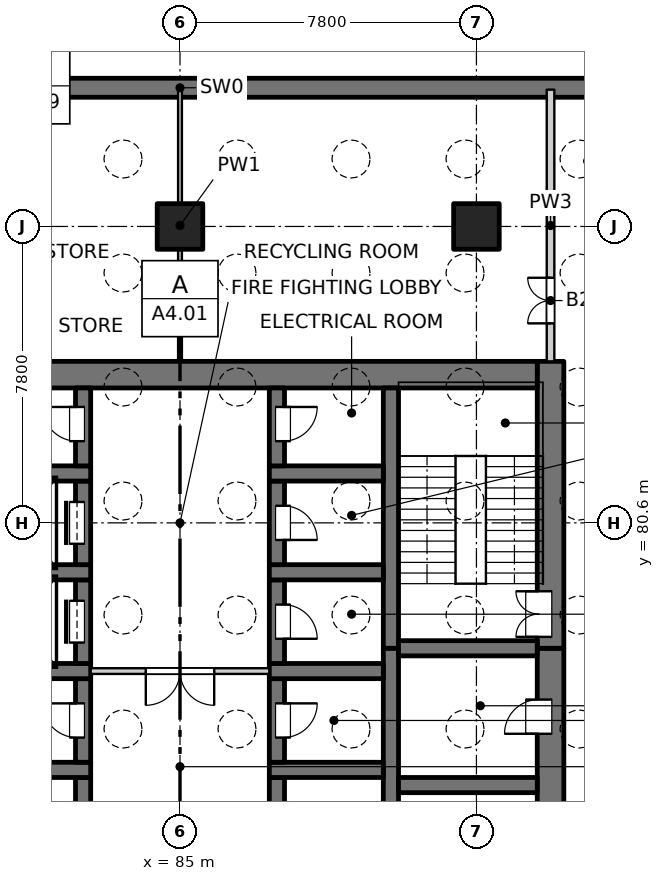
"""IFC4 building model, lengths in metres.
Left out: names, types, materials, properties, quantities, classifications, styles, units other than length and angle.
Written with IfcOpenShell. Run it as: python <this file> out.ifc"""

import sys

from ifc_helpers import new_model, si_unit, direction, frame, frame_2d, origin, origin_2d, place, context, subcontext, project, spatial, rectangle, extrude, element, fill, save


model = new_model("IFC4")
c1 = context("Model", 3, precision=1e-05, world=origin(), true_north=direction((0.0, 1.0)))
c2 = subcontext(c1, "Body", "Model", "MODEL_VIEW")
j1 = project(units=[si_unit("LENGTHUNIT", "METRE"), si_unit("PLANEANGLEUNIT", "RADIAN")], contexts=[c1])
p1 = place(None, origin())
s1 = spatial("IfcSite", under=j1, at=p1, CompositionType="ELEMENT")
p2 = place(p1, origin())
s2 = spatial("IfcBuilding", under=s1, at=p2, CompositionType="ELEMENT")
p3 = place(p2, frame((0.0, 0.0, -9.0)))
s3 = spatial("IfcBuildingStorey", under=s2, at=p3, CompositionType="ELEMENT", Elevation=-9.0)
p4 = place(p3, frame((42.6, 92.05, -0.5), z_axis=(0.0, 0.0, 1.0), x_axis=(1.0, 0.0, 0.0)))
e1 = element("IfcWall", 1, at=p4, inside=s3, PredefinedType="SOLIDWALL", context=c2, shape_type="SweptSolid", body=[
    extrude(rectangle(XDim=84.8, YDim=0.5, at=frame_2d((42.4, 0.0))), origin(), (0.0, 0.0, 1.0), 4.65),
])
for number, where, z_axis, x_axis in (
    (2, (85.0, 88.4, -0.5), (0.0, 0.0, 1.0), (1.0, 0.0, 0.0)),
    (3, (92.8, 88.4, -0.5), (0.0, 0.0, 1.0), (1.0, 0.0, 0.0)),
):
    element("IfcColumn", number, at=place(p3, frame(where, z_axis=z_axis, x_axis=x_axis)), inside=s3, PredefinedType="COLUMN", context=c2, shape_type="SweptSolid", body=[
        extrude(rectangle(XDim=1.2, YDim=1.2, at=origin_2d()), origin(), (0.0, 0.0, 1.0), 4.65),
    ])
p5 = place(p3, frame((94.75, 61.95, -0.5), z_axis=(0.0, 0.0, 1.0), x_axis=(0.0, 1.0, 0.0)))
e4 = element("IfcWall", 4, at=p5, inside=s3, PredefinedType="SOLIDWALL", context=c2, shape_type="SweptSolid", body=[
    extrude(rectangle(XDim=15.35, YDim=0.7, at=frame_2d((7.675, 0.0))), origin(), (0.0, 0.0, 1.0), 4.65),
])
p6 = place(p5, frame((0.925, 0.0, 0.5)))
e5 = element("IfcOpeningElement", 5, at=p6, cuts=e4, PredefinedType="OPENING", context=c2, shape_type="SweptSolid", body=[
    extrude(rectangle(XDim=0.9, YDim=2.1, at=frame_2d((0.45, 1.05))), frame((0.0, 0.36, 0.0), z_axis=(0.0, -1.0, 0.0), x_axis=(1.0, 0.0, 0.0)), (0.0, 0.0, 1.0), 0.72),
])
p7 = place(p5, frame((6.8, 0.0, 0.5)))
e6 = element("IfcOpeningElement", 6, at=p7, cuts=e4, PredefinedType="OPENING", context=c2, shape_type="SweptSolid", body=[
    extrude(rectangle(XDim=0.9, YDim=2.1, at=frame_2d((0.45, 1.05))), frame((0.0, 0.36, 0.0), z_axis=(0.0, -1.0, 0.0), x_axis=(1.0, 0.0, 0.0)), (0.0, 0.0, 1.0), 0.72),
])
p8 = place(p5, frame((13.1, 0.0, 0.5)))
e7 = element("IfcOpeningElement", 7, at=p8, cuts=e4, PredefinedType="OPENING", context=c2, shape_type="SweptSolid", body=[
    extrude(rectangle(XDim=0.9, YDim=2.1, at=frame_2d((0.45, 1.05))), frame((0.0, 0.36, 0.0), z_axis=(0.0, -1.0, 0.0), x_axis=(1.0, 0.0, 0.0)), (0.0, 0.0, 1.0), 0.72),
])
p9 = place(p3, frame((94.75, 77.3, -0.5), z_axis=(0.0, 0.0, 1.0), x_axis=(0.0, 1.0, 0.0)))
e8 = element("IfcWall", 8, at=p9, inside=s3, PredefinedType="SOLIDWALL", context=c2, shape_type="SweptSolid", body=[
    extrude(rectangle(XDim=7.55, YDim=0.7, at=frame_2d((3.775, 0.0))), origin(), (0.0, 0.0, 1.0), 4.65),
])
p10 = place(p9, frame((0.3, 0.0, 0.5)))
e9 = element("IfcOpeningElement", 9, at=p10, cuts=e8, PredefinedType="OPENING", context=c2, shape_type="SweptSolid", body=[
    extrude(rectangle(XDim=1.2, YDim=2.1, at=frame_2d((0.6, 1.05))), frame((0.0, 0.36, 0.0), z_axis=(0.0, -1.0, 0.0), x_axis=(1.0, 0.0, 0.0)), (0.0, 0.0, 1.0), 0.72),
])
p11 = place(p3, frame((75.6, 84.5, -0.5), z_axis=(0.0, 0.0, 1.0), x_axis=(1.0, 0.0, 0.0)))
e10 = element("IfcWall", 10, at=p11, inside=s3, PredefinedType="SOLIDWALL", context=c2, shape_type="SweptSolid", body=[
    extrude(rectangle(XDim=18.8, YDim=0.7, at=frame_2d((9.4, 0.0))), origin(), (0.0, 0.0, 1.0), 4.65),
])
p12 = place(p3, frame((90.55, 61.95, -0.5), z_axis=(0.0, 0.0, 1.0), x_axis=(0.0, 1.0, 0.0)))
e11 = element("IfcWall", 11, at=p12, inside=s3, PredefinedType="SOLIDWALL", context=c2, shape_type="SweptSolid", body=[
    extrude(rectangle(XDim=15.35, YDim=0.4, at=frame_2d((7.675, 0.0))), origin(), (0.0, 0.0, 1.0), 4.65),
])
p13 = place(p3, frame((90.55, 77.3, -0.5), z_axis=(0.0, 0.0, 1.0), x_axis=(0.0, 1.0, 0.0)))
e12 = element("IfcWall", 12, at=p13, inside=s3, PredefinedType="SOLIDWALL", context=c2, shape_type="SweptSolid", body=[
    extrude(rectangle(XDim=6.85, YDim=0.4, at=frame_2d((3.425, 0.0))), origin(), (0.0, 0.0, 1.0), 4.65),
])
p14 = place(p3, frame((82.45, 71.7, -0.5), z_axis=(0.0, 0.0, 1.0), x_axis=(0.0, 1.0, 0.0)))
e13 = element("IfcWall", 13, at=p14, inside=s3, PredefinedType="SOLIDWALL", context=c2, shape_type="SweptSolid", body=[
    extrude(rectangle(XDim=2.2, YDim=0.4, at=frame_2d((1.1, 0.0))), origin(), (0.0, 0.0, 1.0), 4.65),
])
p15 = place(p14, frame((0.65, 0.0, 0.5)))
e14 = element("IfcOpeningElement", 14, at=p15, cuts=e13, PredefinedType="OPENING", context=c2, shape_type="SweptSolid", body=[
    extrude(rectangle(XDim=0.9, YDim=2.1, at=frame_2d((0.45, 1.05))), frame((0.0, 0.21, 0.0), z_axis=(0.0, -1.0, 0.0), x_axis=(1.0, 0.0, 0.0)), (0.0, 0.0, 1.0), 0.42),
])
p16 = place(p3, frame((79.65, 74.1, -0.5), z_axis=(0.0, 0.0, 1.0), x_axis=(1.0, 0.0, 0.0)))
e15 = element("IfcWall", 15, at=p16, inside=s3, PredefinedType="SOLIDWALL", context=c2, shape_type="SweptSolid", body=[
    extrude(rectangle(XDim=3.0, YDim=0.4, at=frame_2d((1.5, 0.0))), origin(), (0.0, 0.0, 1.0), 4.65),
])
p17 = place(p3, frame((82.45, 74.3, -0.5), z_axis=(0.0, 0.0, 1.0), x_axis=(0.0, 1.0, 0.0)))
e16 = element("IfcWall", 16, at=p17, inside=s3, PredefinedType="SOLIDWALL", context=c2, shape_type="SweptSolid", body=[
    extrude(rectangle(XDim=2.2, YDim=0.4, at=frame_2d((1.1, 0.0))), origin(), (0.0, 0.0, 1.0), 4.65),
])
p18 = place(p17, frame((0.65, 0.0, 0.5)))
e17 = element("IfcOpeningElement", 17, at=p18, cuts=e16, PredefinedType="OPENING", context=c2, shape_type="SweptSolid", body=[
    extrude(rectangle(XDim=0.9, YDim=2.1, at=frame_2d((0.45, 1.05))), frame((0.0, 0.21, 0.0), z_axis=(0.0, -1.0, 0.0), x_axis=(1.0, 0.0, 0.0)), (0.0, 0.0, 1.0), 0.42),
])
p19 = place(p3, frame((79.65, 76.7, -0.5), z_axis=(0.0, 0.0, 1.0), x_axis=(1.0, 0.0, 0.0)))
e18 = element("IfcWall", 18, at=p19, inside=s3, PredefinedType="SOLIDWALL", context=c2, shape_type="SweptSolid", body=[
    extrude(rectangle(XDim=3.0, YDim=0.4, at=frame_2d((1.5, 0.0))), origin(), (0.0, 0.0, 1.0), 4.65),
])
p20 = place(p3, frame((82.45, 76.9, -0.5), z_axis=(0.0, 0.0, 1.0), x_axis=(0.0, 1.0, 0.0)))
e19 = element("IfcWall", 19, at=p20, inside=s3, PredefinedType="SOLIDWALL", context=c2, shape_type="SweptSolid", body=[
    extrude(rectangle(XDim=2.2, YDim=0.4, at=frame_2d((1.1, 0.0))), origin(), (0.0, 0.0, 1.0), 4.65),
])
p21 = place(p20, frame((0.55, 0.0, 0.5)))
e20 = element("IfcOpeningElement", 20, at=p21, cuts=e19, PredefinedType="OPENING", context=c2, shape_type="SweptSolid", body=[
    extrude(rectangle(XDim=1.1, YDim=2.1, at=frame_2d((0.55, 1.05))), frame((0.0, 0.21, 0.0), z_axis=(0.0, -1.0, 0.0), x_axis=(1.0, 0.0, 0.0)), (0.0, 0.0, 1.0), 0.42),
])
p22 = place(p3, frame((79.65, 79.3, -0.5), z_axis=(0.0, 0.0, 1.0), x_axis=(1.0, 0.0, 0.0)))
e21 = element("IfcWall", 21, at=p22, inside=s3, PredefinedType="SOLIDWALL", context=c2, shape_type="SweptSolid", body=[
    extrude(rectangle(XDim=3.0, YDim=0.4, at=frame_2d((1.5, 0.0))), origin(), (0.0, 0.0, 1.0), 4.65),
])
p23 = place(p3, frame((82.45, 79.5, -0.5), z_axis=(0.0, 0.0, 1.0), x_axis=(0.0, 1.0, 0.0)))
e22 = element("IfcWall", 22, at=p23, inside=s3, PredefinedType="SOLIDWALL", context=c2, shape_type="SweptSolid", body=[
    extrude(rectangle(XDim=2.2, YDim=0.4, at=frame_2d((1.1, 0.0))), origin(), (0.0, 0.0, 1.0), 4.65),
])
p24 = place(p23, frame((0.55, 0.0, 0.5)))
e23 = element("IfcOpeningElement", 23, at=p24, cuts=e22, PredefinedType="OPENING", context=c2, shape_type="SweptSolid", body=[
    extrude(rectangle(XDim=1.1, YDim=2.1, at=frame_2d((0.55, 1.05))), frame((0.0, 0.21, 0.0), z_axis=(0.0, -1.0, 0.0), x_axis=(1.0, 0.0, 0.0)), (0.0, 0.0, 1.0), 0.42),
])
p25 = place(p3, frame((79.65, 81.9, -0.5), z_axis=(0.0, 0.0, 1.0), x_axis=(1.0, 0.0, 0.0)))
e24 = element("IfcWall", 24, at=p25, inside=s3, PredefinedType="SOLIDWALL", context=c2, shape_type="SweptSolid", body=[
    extrude(rectangle(XDim=3.0, YDim=0.4, at=frame_2d((1.5, 0.0))), origin(), (0.0, 0.0, 1.0), 4.65),
])
p26 = place(p3, frame((82.45, 82.1, -0.5), z_axis=(0.0, 0.0, 1.0), x_axis=(0.0, 1.0, 0.0)))
e25 = element("IfcWall", 25, at=p26, inside=s3, PredefinedType="SOLIDWALL", context=c2, shape_type="SweptSolid", body=[
    extrude(rectangle(XDim=2.05, YDim=0.4, at=frame_2d((1.025, 0.0))), origin(), (0.0, 0.0, 1.0), 4.65),
])
p27 = place(p26, frame((0.65, 0.0, 0.5)))
e26 = element("IfcOpeningElement", 26, at=p27, cuts=e25, PredefinedType="OPENING", context=c2, shape_type="SweptSolid", body=[
    extrude(rectangle(XDim=0.9, YDim=2.1, at=frame_2d((0.45, 1.05))), frame((0.0, 0.21, 0.0), z_axis=(0.0, -1.0, 0.0), x_axis=(1.0, 0.0, 0.0)), (0.0, 0.0, 1.0), 0.42),
])
p28 = place(p3, frame((87.55, 71.7, -0.5), z_axis=(0.0, 0.0, 1.0), x_axis=(0.0, 1.0, 0.0)))
e27 = element("IfcWall", 27, at=p28, inside=s3, PredefinedType="SOLIDWALL", context=c2, shape_type="SweptSolid", body=[
    extrude(rectangle(XDim=2.2, YDim=0.4, at=frame_2d((1.1, 0.0))), origin(), (0.0, 0.0, 1.0), 4.65),
])
p29 = place(p28, frame((0.65, 0.0, 0.5)))
e28 = element("IfcOpeningElement", 28, at=p29, cuts=e27, PredefinedType="OPENING", context=c2, shape_type="SweptSolid", body=[
    extrude(rectangle(XDim=0.9, YDim=2.1, at=frame_2d((0.45, 1.05))), frame((0.0, 0.21, 0.0), z_axis=(0.0, -1.0, 0.0), x_axis=(1.0, 0.0, 0.0)), (0.0, 0.0, 1.0), 0.42),
])
p30 = place(p3, frame((87.35, 74.1, -0.5), z_axis=(0.0, 0.0, 1.0), x_axis=(1.0, 0.0, 0.0)))
e29 = element("IfcWall", 29, at=p30, inside=s3, PredefinedType="SOLIDWALL", context=c2, shape_type="SweptSolid", body=[
    extrude(rectangle(XDim=3.0, YDim=0.4, at=frame_2d((1.5, 0.0))), origin(), (0.0, 0.0, 1.0), 4.65),
])
p31 = place(p3, frame((87.55, 74.3, -0.5), z_axis=(0.0, 0.0, 1.0), x_axis=(0.0, 1.0, 0.0)))
e30 = element("IfcWall", 30, at=p31, inside=s3, PredefinedType="SOLIDWALL", context=c2, shape_type="SweptSolid", body=[
    extrude(rectangle(XDim=2.2, YDim=0.4, at=frame_2d((1.1, 0.0))), origin(), (0.0, 0.0, 1.0), 4.65),
])
p32 = place(p31, frame((0.65, 0.0, 0.5)))
e31 = element("IfcOpeningElement", 31, at=p32, cuts=e30, PredefinedType="OPENING", context=c2, shape_type="SweptSolid", body=[
    extrude(rectangle(XDim=0.9, YDim=2.1, at=frame_2d((0.45, 1.05))), frame((0.0, 0.21, 0.0), z_axis=(0.0, -1.0, 0.0), x_axis=(1.0, 0.0, 0.0)), (0.0, 0.0, 1.0), 0.42),
])
p33 = place(p3, frame((87.35, 76.7, -0.5), z_axis=(0.0, 0.0, 1.0), x_axis=(1.0, 0.0, 0.0)))
e32 = element("IfcWall", 32, at=p33, inside=s3, PredefinedType="SOLIDWALL", context=c2, shape_type="SweptSolid", body=[
    extrude(rectangle(XDim=3.0, YDim=0.4, at=frame_2d((1.5, 0.0))), origin(), (0.0, 0.0, 1.0), 4.65),
])
p34 = place(p3, frame((87.55, 76.9, -0.5), z_axis=(0.0, 0.0, 1.0), x_axis=(0.0, 1.0, 0.0)))
e33 = element("IfcWall", 33, at=p34, inside=s3, PredefinedType="SOLIDWALL", context=c2, shape_type="SweptSolid", body=[
    extrude(rectangle(XDim=2.2, YDim=0.4, at=frame_2d((1.1, 0.0))), origin(), (0.0, 0.0, 1.0), 4.65),
])
p35 = place(p34, frame((0.65, 0.0, 0.5)))
e34 = element("IfcOpeningElement", 34, at=p35, cuts=e33, PredefinedType="OPENING", context=c2, shape_type="SweptSolid", body=[
    extrude(rectangle(XDim=0.9, YDim=2.1, at=frame_2d((0.45, 1.05))), frame((0.0, 0.21, 0.0), z_axis=(0.0, -1.0, 0.0), x_axis=(1.0, 0.0, 0.0)), (0.0, 0.0, 1.0), 0.42),
])
p36 = place(p3, frame((87.35, 79.3, -0.5), z_axis=(0.0, 0.0, 1.0), x_axis=(1.0, 0.0, 0.0)))
e35 = element("IfcWall", 35, at=p36, inside=s3, PredefinedType="SOLIDWALL", context=c2, shape_type="SweptSolid", body=[
    extrude(rectangle(XDim=3.0, YDim=0.4, at=frame_2d((1.5, 0.0))), origin(), (0.0, 0.0, 1.0), 4.65),
])
p37 = place(p3, frame((87.55, 79.5, -0.5), z_axis=(0.0, 0.0, 1.0), x_axis=(0.0, 1.0, 0.0)))
e36 = element("IfcWall", 36, at=p37, inside=s3, PredefinedType="SOLIDWALL", context=c2, shape_type="SweptSolid", body=[
    extrude(rectangle(XDim=2.2, YDim=0.4, at=frame_2d((1.1, 0.0))), origin(), (0.0, 0.0, 1.0), 4.65),
])
p38 = place(p37, frame((0.65, 0.0, 0.5)))
e37 = element("IfcOpeningElement", 37, at=p38, cuts=e36, PredefinedType="OPENING", context=c2, shape_type="SweptSolid", body=[
    extrude(rectangle(XDim=0.9, YDim=2.1, at=frame_2d((0.45, 1.05))), frame((0.0, 0.21, 0.0), z_axis=(0.0, -1.0, 0.0), x_axis=(1.0, 0.0, 0.0)), (0.0, 0.0, 1.0), 0.42),
])
p39 = place(p3, frame((87.35, 81.9, -0.5), z_axis=(0.0, 0.0, 1.0), x_axis=(1.0, 0.0, 0.0)))
e38 = element("IfcWall", 38, at=p39, inside=s3, PredefinedType="SOLIDWALL", context=c2, shape_type="SweptSolid", body=[
    extrude(rectangle(XDim=3.0, YDim=0.4, at=frame_2d((1.5, 0.0))), origin(), (0.0, 0.0, 1.0), 4.65),
])
p40 = place(p3, frame((87.55, 82.1, -0.5), z_axis=(0.0, 0.0, 1.0), x_axis=(0.0, 1.0, 0.0)))
e39 = element("IfcWall", 39, at=p40, inside=s3, PredefinedType="SOLIDWALL", context=c2, shape_type="SweptSolid", body=[
    extrude(rectangle(XDim=2.05, YDim=0.4, at=frame_2d((1.025, 0.0))), origin(), (0.0, 0.0, 1.0), 4.65),
])
p41 = place(p40, frame((0.65, 0.0, 0.5)))
e40 = element("IfcOpeningElement", 40, at=p41, cuts=e39, PredefinedType="OPENING", context=c2, shape_type="SweptSolid", body=[
    extrude(rectangle(XDim=0.9, YDim=2.1, at=frame_2d((0.45, 1.05))), frame((0.0, 0.21, 0.0), z_axis=(0.0, -1.0, 0.0), x_axis=(1.0, 0.0, 0.0)), (0.0, 0.0, 1.0), 0.42),
])
for number, where, z_axis, x_axis in (
    (41, (90.75, 73.7, -0.5), (0.0, 0.0, 1.0), (1.0, 0.0, 0.0)),
    (42, (90.75, 77.3, -0.5), (0.0, 0.0, 1.0), (1.0, 0.0, 0.0)),
):
    element("IfcWall", number, at=place(p3, frame(where, z_axis=z_axis, x_axis=x_axis)), inside=s3, PredefinedType="SOLIDWALL", context=c2, shape_type="SweptSolid", body=[
        extrude(rectangle(XDim=3.65, YDim=0.4, at=frame_2d((1.825, 0.0))), origin(), (0.0, 0.0, 1.0), 4.65),
    ])
p42 = place(p3, frame((82.65, 76.7, 0.0), z_axis=(0.0, 0.0, 1.0), x_axis=(1.0, 0.0, 0.0)))
e43 = element("IfcWall", 43, at=p42, inside=s3, PredefinedType="PARTITIONING", context=c2, shape_type="SweptSolid", body=[
    extrude(rectangle(XDim=4.7, YDim=0.15, at=frame_2d((2.35, 0.0))), origin(), (0.0, 0.0, 1.0), 4.15),
])
p43 = place(p42, frame((1.45, 0.0, 0.0)))
e44 = element("IfcOpeningElement", 44, at=p43, cuts=e43, PredefinedType="OPENING", context=c2, shape_type="SweptSolid", body=[
    extrude(rectangle(XDim=1.8, YDim=2.1, at=frame_2d((0.9, 1.05))), frame((0.0, 0.085, 0.0), z_axis=(0.0, -1.0, 0.0), x_axis=(1.0, 0.0, 0.0)), (0.0, 0.0, 1.0), 0.17),
])
p44 = place(p3, frame((85.0, 84.85, 0.0), z_axis=(0.0, 0.0, 1.0), x_axis=(0.0, 1.0, 0.0)))
e45 = element("IfcWall", 45, at=p44, inside=s3, PredefinedType="PARTITIONING", context=c2, shape_type="SweptSolid", body=[
    extrude(rectangle(XDim=7.15, YDim=0.1, at=frame_2d((3.575, 0.0))), origin(), (0.0, 0.0, 1.0), 4.15),
])
p45 = place(p3, frame((94.75, 84.85, 0.0), z_axis=(0.0, 0.0, 1.0), x_axis=(0.0, 1.0, 0.0)))
e46 = element("IfcWall", 46, at=p45, inside=s3, PredefinedType="PARTITIONING", context=c2, shape_type="SweptSolid", body=[
    extrude(rectangle(XDim=7.15, YDim=0.2, at=frame_2d((3.575, 0.0))), origin(), (0.0, 0.0, 1.0), 4.15),
])
p46 = place(p45, frame((1.0, 0.0, 0.0)))
e47 = element("IfcOpeningElement", 47, at=p46, cuts=e46, PredefinedType="OPENING", context=c2, shape_type="SweptSolid", body=[
    extrude(rectangle(XDim=1.2, YDim=2.1, at=frame_2d((0.6, 1.05))), frame((0.0, 0.11, 0.0), z_axis=(0.0, -1.0, 0.0), x_axis=(1.0, 0.0, 0.0)), (0.0, 0.0, 1.0), 0.22),
])
p47 = place(p18, origin())
e48 = element("IfcDoor", 48, at=p47, inside=s3, OperationType="SINGLE_SWING_RIGHT", PredefinedType="DOOR", context=c2, shape_type="SweptSolid", body=[
    extrude(rectangle(XDim=0.9, YDim=2.1, at=frame_2d((0.45, 1.05))), frame((0.0, 0.185, 0.0), z_axis=(0.0, -1.0, 0.0), x_axis=(1.0, 0.0, 0.0)), (0.0, 0.0, 1.0), 0.05),
])
fill(e17, e48)
p48 = place(p32, origin())
e49 = element("IfcDoor", 49, at=p48, inside=s3, OperationType="SINGLE_SWING_LEFT", PredefinedType="DOOR", context=c2, shape_type="SweptSolid", body=[
    extrude(rectangle(XDim=0.9, YDim=2.1, at=frame_2d((0.45, 1.05))), frame((0.0, -0.135, 0.0), z_axis=(0.0, -1.0, 0.0), x_axis=(1.0, 0.0, 0.0)), (0.0, 0.0, 1.0), 0.05),
])
fill(e31, e49)
p49 = place(p8, origin())
e50 = element("IfcDoor", 50, at=p49, inside=s3, OperationType="SINGLE_SWING_LEFT", PredefinedType="DOOR", context=c2, shape_type="SweptSolid", body=[
    extrude(rectangle(XDim=0.9, YDim=2.1, at=frame_2d((0.45, 1.05))), frame((0.0, 0.335, 0.0), z_axis=(0.0, -1.0, 0.0), x_axis=(1.0, 0.0, 0.0)), (0.0, 0.0, 1.0), 0.05),
])
fill(e7, e50)
p50 = place(p43, origin())
e51 = element("IfcDoor", 51, at=p50, inside=s3, OperationType="DOUBLE_DOOR_SINGLE_SWING", PredefinedType="DOOR", context=c2, shape_type="SweptSolid", body=[
    extrude(rectangle(XDim=1.8, YDim=2.1, at=frame_2d((0.9, 1.05))), frame((0.0, 0.025, 0.0), z_axis=(0.0, -1.0, 0.0), x_axis=(1.0, 0.0, 0.0)), (0.0, 0.0, 1.0), 0.05),
])
fill(e44, e51)
p51 = place(p21, origin())
e52 = element("IfcDoor", 52, at=p51, inside=s3, OperationType="SLIDING_TO_LEFT", PredefinedType="DOOR", context=c2, shape_type="SweptSolid", body=[
    extrude(rectangle(XDim=1.1, YDim=2.1, at=frame_2d((0.55, 1.05))), frame((0.0, 0.185, 0.0), z_axis=(0.0, -1.0, 0.0), x_axis=(1.0, 0.0, 0.0)), (0.0, 0.0, 1.0), 0.05),
])
fill(e20, e52)
p52 = place(p35, origin())
e53 = element("IfcDoor", 53, at=p52, inside=s3, OperationType="SINGLE_SWING_RIGHT", PredefinedType="DOOR", context=c2, shape_type="SweptSolid", body=[
    extrude(rectangle(XDim=0.9, YDim=2.1, at=frame_2d((0.45, 1.05))), frame((0.0, -0.135, 0.0), z_axis=(0.0, -1.0, 0.0), x_axis=(1.0, 0.0, 0.0)), (0.0, 0.0, 1.0), 0.05),
])
fill(e34, e53)
p53 = place(p10, origin())
e54 = element("IfcDoor", 54, at=p53, inside=s3, OperationType="DOUBLE_DOOR_SINGLE_SWING", PredefinedType="DOOR", context=c2, shape_type="SweptSolid", body=[
    extrude(rectangle(XDim=1.2, YDim=2.1, at=frame_2d((0.6, 1.05))), frame((0.0, 0.335, 0.0), z_axis=(0.0, -1.0, 0.0), x_axis=(1.0, 0.0, 0.0)), (0.0, 0.0, 1.0), 0.05),
])
fill(e9, e54)
p54 = place(p24, origin())
e55 = element("IfcDoor", 55, at=p54, inside=s3, OperationType="SLIDING_TO_LEFT", PredefinedType="DOOR", context=c2, shape_type="SweptSolid", body=[
    extrude(rectangle(XDim=1.1, YDim=2.1, at=frame_2d((0.55, 1.05))), frame((0.0, 0.185, 0.0), z_axis=(0.0, -1.0, 0.0), x_axis=(1.0, 0.0, 0.0)), (0.0, 0.0, 1.0), 0.05),
])
fill(e23, e55)
p55 = place(p38, origin())
e56 = element("IfcDoor", 56, at=p55, inside=s3, OperationType="SINGLE_SWING_RIGHT", PredefinedType="DOOR", context=c2, shape_type="SweptSolid", body=[
    extrude(rectangle(XDim=0.9, YDim=2.1, at=frame_2d((0.45, 1.05))), frame((0.0, -0.135, 0.0), z_axis=(0.0, -1.0, 0.0), x_axis=(1.0, 0.0, 0.0)), (0.0, 0.0, 1.0), 0.05),
])
fill(e37, e56)
p56 = place(p27, origin())
e57 = element("IfcDoor", 57, at=p56, inside=s3, OperationType="SINGLE_SWING_RIGHT", PredefinedType="DOOR", context=c2, shape_type="SweptSolid", body=[
    extrude(rectangle(XDim=0.9, YDim=2.1, at=frame_2d((0.45, 1.05))), frame((0.0, 0.185, 0.0), z_axis=(0.0, -1.0, 0.0), x_axis=(1.0, 0.0, 0.0)), (0.0, 0.0, 1.0), 0.05),
])
fill(e26, e57)
p57 = place(p41, origin())
e58 = element("IfcDoor", 58, at=p57, inside=s3, OperationType="SINGLE_SWING_LEFT", PredefinedType="DOOR", context=c2, shape_type="SweptSolid", body=[
    extrude(rectangle(XDim=0.9, YDim=2.1, at=frame_2d((0.45, 1.05))), frame((0.0, -0.135, 0.0), z_axis=(0.0, -1.0, 0.0), x_axis=(1.0, 0.0, 0.0)), (0.0, 0.0, 1.0), 0.05),
])
fill(e40, e58)
p58 = place(p46, origin())
e59 = element("IfcDoor", 59, at=p58, inside=s3, OperationType="DOUBLE_DOOR_SINGLE_SWING", PredefinedType="DOOR", context=c2, shape_type="SweptSolid", body=[
    extrude(rectangle(XDim=1.2, YDim=2.1, at=frame_2d((0.6, 1.05))), frame((0.0, 0.025, 0.0), z_axis=(0.0, -1.0, 0.0), x_axis=(1.0, 0.0, 0.0)), (0.0, 0.0, 1.0), 0.05),
])
fill(e47, e59)
save(model, sys.argv[1])
